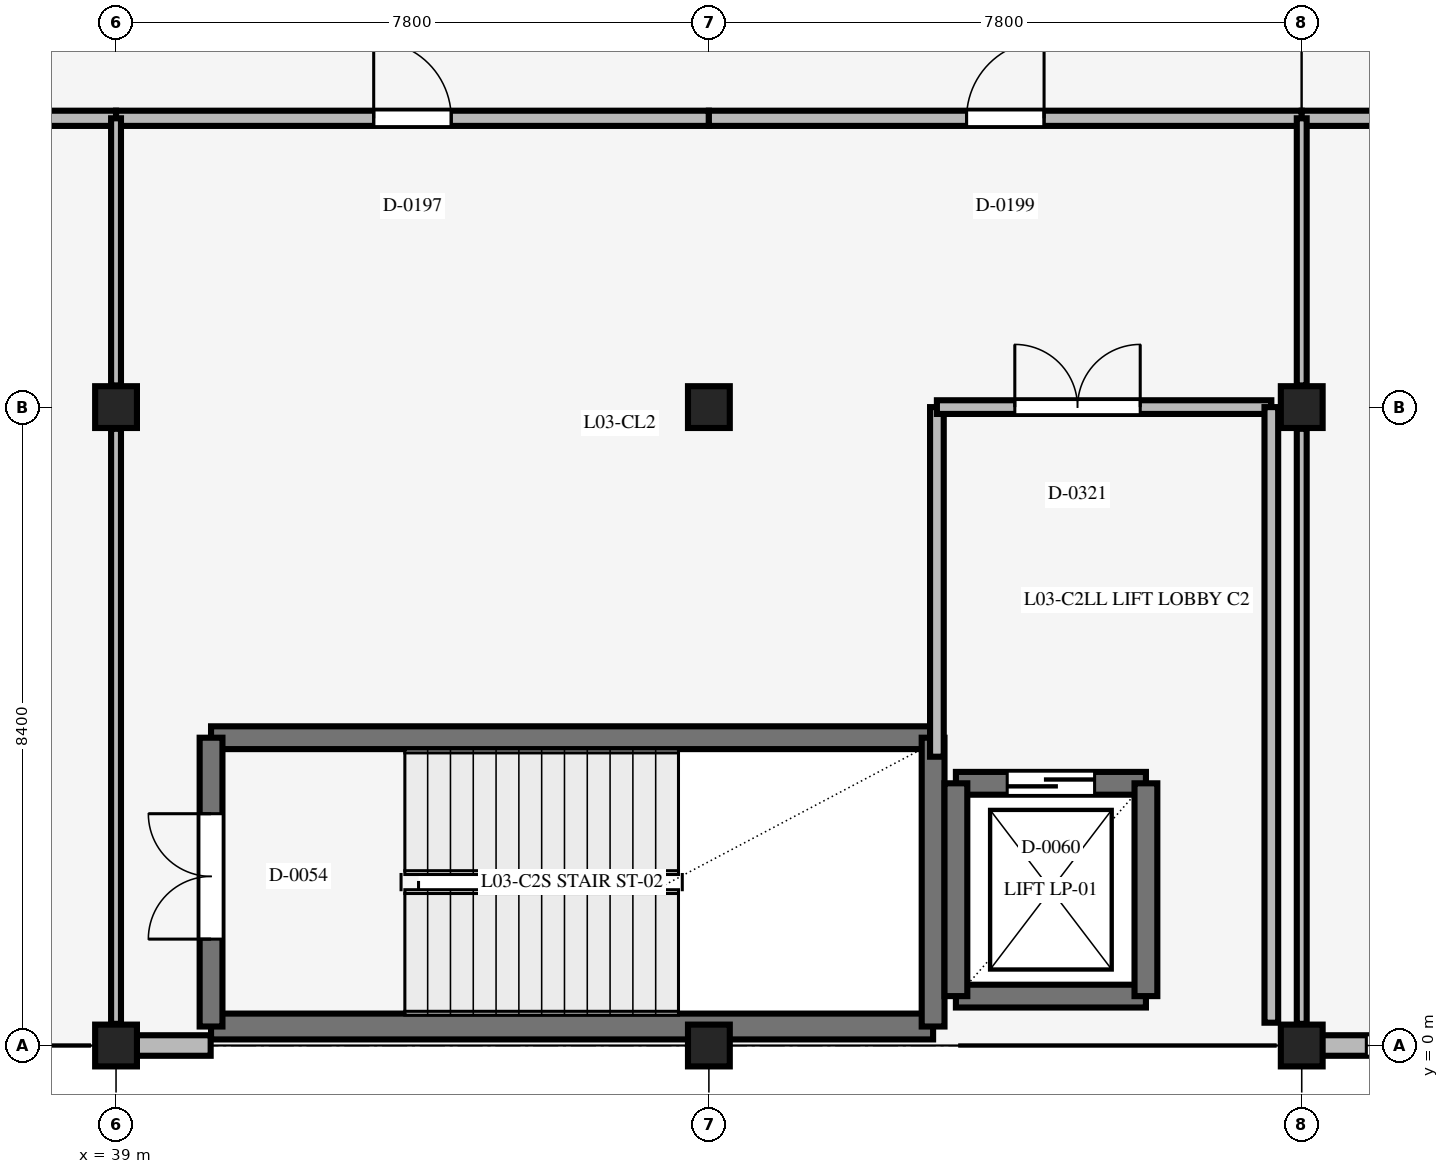
"""IFC4 building model, lengths in metres.
Left out: names, types, materials, properties, quantities, classifications, styles, units other than length and angle.
Written with IfcOpenShell. Run it as: python <this file> out.ifc"""

import sys

from ifc_helpers import new_model, si_unit, direction, frame, frame_2d, origin, origin_2d, place, context, subcontext, project, spatial, rectangle, extrude, element, fill, save


model = new_model("IFC4")
c1 = context("Model", 3, precision=1e-05, world=origin(), true_north=direction((0.0, 1.0)))
c2 = subcontext(c1, "Body", "Model", "MODEL_VIEW")
j1 = project(units=[si_unit("LENGTHUNIT", "METRE"), si_unit("PLANEANGLEUNIT", "RADIAN")], contexts=[c1])
p1 = place(None, origin())
s1 = spatial("IfcSite", under=j1, at=p1, CompositionType="ELEMENT")
p2 = place(p1, origin())
s2 = spatial("IfcBuilding", under=s1, at=p2, CompositionType="ELEMENT")
p3 = place(p2, frame((0.0, 0.0, 15.9)))
s3 = spatial("IfcBuildingStorey", under=s2, at=p3, CompositionType="ELEMENT", Elevation=15.9)
for number, where, z_axis, x_axis in (
    (1, (39.0, 0.0, 0.0), (0.0, 0.0, 1.0), (1.0, 0.0, 0.0)),
    (2, (39.0, 8.4, 0.0), (0.0, 0.0, 1.0), (1.0, 0.0, 0.0)),
    (3, (46.8, 0.0, 0.0), (0.0, 0.0, 1.0), (1.0, 0.0, 0.0)),
    (4, (46.8, 8.4, 0.0), (0.0, 0.0, 1.0), (1.0, 0.0, 0.0)),
    (5, (54.6, 0.0, 0.0), (0.0, 0.0, 1.0), (1.0, 0.0, 0.0)),
    (6, (54.6, 8.4, 0.0), (0.0, 0.0, 1.0), (1.0, 0.0, 0.0)),
):
    element("IfcColumn", number, at=place(p3, frame(where, z_axis=z_axis, x_axis=x_axis)), inside=s3, PredefinedType="COLUMN", context=c2, shape_type="SweptSolid", body=[
        extrude(rectangle(XDim=0.55, YDim=0.55, at=origin_2d()), origin(), (0.0, 0.0, 1.0), 3.9),
    ])
p4 = place(p3, frame((49.75, 0.25, 0.0), z_axis=(0.0, 0.0, 1.0), x_axis=(-1.0, 0.0, 0.0)))
e7 = element("IfcWall", 7, at=p4, inside=s3, PredefinedType="STANDARD", context=c2, shape_type="SweptSolid", body=[
    extrude(rectangle(XDim=9.5, YDim=0.34, at=frame_2d((4.75, 0.0))), origin(), (0.0, 0.0, 1.0), 3.9),
])
p5 = place(p3, frame((40.25, 4.05, 0.0), z_axis=(0.0, 0.0, 1.0), x_axis=(1.0, 0.0, 0.0)))
e8 = element("IfcWall", 8, at=p5, inside=s3, PredefinedType="SHEAR", context=c2, shape_type="SweptSolid", body=[
    extrude(rectangle(XDim=9.5, YDim=0.3, at=frame_2d((4.75, 0.0))), origin(), (0.0, 0.0, 1.0), 3.9),
])
p6 = place(p3, frame((40.25, 0.25, 0.0), z_axis=(0.0, 0.0, 1.0), x_axis=(0.0, 1.0, 0.0)))
e9 = element("IfcWall", 9, at=p6, inside=s3, PredefinedType="SHEAR", context=c2, shape_type="SweptSolid", body=[
    extrude(rectangle(XDim=3.8, YDim=0.3, at=frame_2d((1.9, 0.0))), origin(), (0.0, 0.0, 1.0), 3.9),
])
p7 = place(p6, frame((1.15, 0.0, 0.0)))
e10 = element("IfcOpeningElement", 10, at=p7, cuts=e9, PredefinedType="OPENING", context=c2, shape_type="SweptSolid", body=[
    extrude(rectangle(XDim=1.65, YDim=2.2, at=frame_2d((0.825, 1.1))), frame((0.0, 0.16, 0.0), z_axis=(0.0, -1.0, 0.0), x_axis=(1.0, 0.0, 0.0)), (0.0, 0.0, 1.0), 0.32),
])
p8 = place(p3, frame((49.75, 0.25, 0.0), z_axis=(0.0, 0.0, 1.0), x_axis=(0.0, 1.0, 0.0)))
e11 = element("IfcWall", 11, at=p8, inside=s3, PredefinedType="SHEAR", context=c2, shape_type="SweptSolid", body=[
    extrude(rectangle(XDim=3.8, YDim=0.3, at=frame_2d((1.9, 0.0))), origin(), (0.0, 0.0, 1.0), 3.9),
])
p9 = place(p3, frame((50.05, 0.65, 0.0), z_axis=(0.0, 0.0, 1.0), x_axis=(1.0, 0.0, 0.0)))
e12 = element("IfcWall", 12, at=p9, inside=s3, PredefinedType="SHEAR", context=c2, shape_type="SweptSolid", body=[
    extrude(rectangle(XDim=2.5, YDim=0.3, at=frame_2d((1.25, 0.0))), origin(), (0.0, 0.0, 1.0), 3.64),
])
p10 = place(p3, frame((50.05, 3.45, 0.0), z_axis=(0.0, 0.0, 1.0), x_axis=(1.0, 0.0, 0.0)))
e13 = element("IfcWall", 13, at=p10, inside=s3, PredefinedType="SHEAR", context=c2, shape_type="SweptSolid", body=[
    extrude(rectangle(XDim=2.5, YDim=0.3, at=frame_2d((1.25, 0.0))), origin(), (0.0, 0.0, 1.0), 3.64),
])
p11 = place(p10, frame((0.675, 0.0, 0.0)))
e14 = element("IfcOpeningElement", 14, at=p11, cuts=e13, PredefinedType="OPENING", context=c2, shape_type="SweptSolid", body=[
    extrude(rectangle(XDim=1.15, YDim=2.2, at=frame_2d((0.575, 1.1))), frame((0.0, 0.16, 0.0), z_axis=(0.0, -1.0, 0.0), x_axis=(1.0, 0.0, 0.0)), (0.0, 0.0, 1.0), 0.32),
])
for number, where, z_axis, x_axis in (
    (15, (50.05, 0.65, 0.0), (0.0, 0.0, 1.0), (0.0, 1.0, 0.0)),
    (16, (52.55, 0.65, 0.0), (0.0, 0.0, 1.0), (0.0, 1.0, 0.0)),
):
    element("IfcWall", number, at=place(p3, frame(where, z_axis=z_axis, x_axis=x_axis)), inside=s3, PredefinedType="SHEAR", context=c2, shape_type="SweptSolid", body=[
        extrude(rectangle(XDim=2.8, YDim=0.3, at=frame_2d((1.4, 0.0))), origin(), (0.0, 0.0, 1.0), 3.64),
    ])
p12 = place(p3, frame((40.245, 0.0, 0.0), z_axis=(0.0, 0.0, 1.0), x_axis=(-1.0, 0.0, 0.0)))
e17 = element("IfcWall", 17, at=p12, inside=s3, PredefinedType="STANDARD", context=c2, shape_type="SweptSolid", body=[
    extrude(rectangle(XDim=0.98, YDim=0.27, at=frame_2d((0.49, 0.0))), origin(), (0.0, 0.0, 1.0), 3.64),
])
p13 = place(p3, frame((57.445, 0.0, 0.0), z_axis=(0.0, 0.0, 1.0), x_axis=(-1.0, 0.0, 0.0)))
e18 = element("IfcWall", 18, at=p13, inside=s3, PredefinedType="STANDARD", context=c2, shape_type="SweptSolid", body=[
    extrude(rectangle(XDim=2.58, YDim=0.27, at=frame_2d((1.29, 0.0))), origin(), (0.0, 0.0, 1.0), 3.64),
])
p14 = place(p13, frame((0.495, 0.0, 0.95)))
e19 = element("IfcOpeningElement", 19, at=p14, cuts=e18, PredefinedType="OPENING", context=c2, shape_type="SweptSolid", body=[
    extrude(rectangle(XDim=1.5, YDim=1.6, at=frame_2d((0.75, 0.8))), frame((0.0, 0.145, 0.0), z_axis=(0.0, -1.0, 0.0), x_axis=(1.0, 0.0, 0.0)), (0.0, 0.0, 1.0), 0.29),
])
p15 = place(p3, frame((31.2, 12.2, 0.0), z_axis=(0.0, 0.0, 1.0), x_axis=(1.0, 0.0, 0.0)))
e20 = element("IfcWall", 20, at=p15, inside=s3, PredefinedType="STANDARD", context=c2, shape_type="SweptSolid", body=[
    extrude(rectangle(XDim=7.8, YDim=0.2, at=frame_2d((3.9, 0.0))), origin(), (0.0, 0.0, 1.0), 2.9),
])
p16 = place(p15, frame((3.39, 0.0, 0.0)))
e21 = element("IfcOpeningElement", 21, at=p16, cuts=e20, PredefinedType="OPENING", context=c2, shape_type="SweptSolid", body=[
    extrude(rectangle(XDim=1.02, YDim=2.15, at=frame_2d((0.51, 1.075))), frame((0.0, 0.11, 0.0), z_axis=(0.0, -1.0, 0.0), x_axis=(1.0, 0.0, 0.0)), (0.0, 0.0, 1.0), 0.22),
])
p17 = place(p3, frame((39.0, 12.2, 0.0), z_axis=(0.0, 0.0, 1.0), x_axis=(1.0, 0.0, 0.0)))
e22 = element("IfcWall", 22, at=p17, inside=s3, PredefinedType="STANDARD", context=c2, shape_type="SweptSolid", body=[
    extrude(rectangle(XDim=7.8, YDim=0.2, at=frame_2d((3.9, 0.0))), origin(), (0.0, 0.0, 1.0), 2.9),
])
p18 = place(p17, frame((3.39, 0.0, 0.0)))
e23 = element("IfcOpeningElement", 23, at=p18, cuts=e22, PredefinedType="OPENING", context=c2, shape_type="SweptSolid", body=[
    extrude(rectangle(XDim=1.02, YDim=2.15, at=frame_2d((0.51, 1.075))), frame((0.0, 0.11, 0.0), z_axis=(0.0, -1.0, 0.0), x_axis=(1.0, 0.0, 0.0)), (0.0, 0.0, 1.0), 0.22),
])
p19 = place(p3, frame((46.8, 12.2, 0.0), z_axis=(0.0, 0.0, 1.0), x_axis=(1.0, 0.0, 0.0)))
e24 = element("IfcWall", 24, at=p19, inside=s3, PredefinedType="STANDARD", context=c2, shape_type="SweptSolid", body=[
    extrude(rectangle(XDim=7.8, YDim=0.2, at=frame_2d((3.9, 0.0))), origin(), (0.0, 0.0, 1.0), 2.9),
])
p20 = place(p19, frame((3.39, 0.0, 0.0)))
e25 = element("IfcOpeningElement", 25, at=p20, cuts=e24, PredefinedType="OPENING", context=c2, shape_type="SweptSolid", body=[
    extrude(rectangle(XDim=1.02, YDim=2.15, at=frame_2d((0.51, 1.075))), frame((0.0, 0.11, 0.0), z_axis=(0.0, -1.0, 0.0), x_axis=(1.0, 0.0, 0.0)), (0.0, 0.0, 1.0), 0.22),
])
p21 = place(p3, frame((54.6, 12.2, 0.0), z_axis=(0.0, 0.0, 1.0), x_axis=(1.0, 0.0, 0.0)))
e26 = element("IfcWall", 26, at=p21, inside=s3, PredefinedType="STANDARD", context=c2, shape_type="SweptSolid", body=[
    extrude(rectangle(XDim=8.58, YDim=0.2, at=frame_2d((4.29, 0.0))), origin(), (0.0, 0.0, 1.0), 2.9),
])
p22 = place(p21, frame((3.69, 0.0, 0.0)))
e27 = element("IfcOpeningElement", 27, at=p22, cuts=e26, PredefinedType="OPENING", context=c2, shape_type="SweptSolid", body=[
    extrude(rectangle(XDim=1.02, YDim=2.15, at=frame_2d((0.51, 1.075))), frame((0.0, 0.11, 0.0), z_axis=(0.0, -1.0, 0.0), x_axis=(1.0, 0.0, 0.0)), (0.0, 0.0, 1.0), 0.22),
])
p23 = place(p3, frame((39.0, 0.285, 0.0), z_axis=(0.0, 0.0, 1.0), x_axis=(0.0, 1.0, 0.0)))
e28 = element("IfcWall", 28, at=p23, inside=s3, PredefinedType="STANDARD", context=c2, shape_type="SweptSolid", body=[
    extrude(rectangle(XDim=7.83, YDim=0.13, at=frame_2d((3.915, 0.0))), origin(), (0.0, 0.0, 1.0), 2.9),
])
p24 = place(p3, frame((39.0, 8.685, 0.0), z_axis=(0.0, 0.0, 1.0), x_axis=(0.0, 1.0, 0.0)))
e29 = element("IfcWall", 29, at=p24, inside=s3, PredefinedType="STANDARD", context=c2, shape_type="SweptSolid", body=[
    extrude(rectangle(XDim=3.515, YDim=0.13, at=frame_2d((1.757, 0.0))), origin(), (0.0, 0.0, 1.0), 2.9),
])
p25 = place(p3, frame((54.6, 0.285, 0.0), z_axis=(0.0, 0.0, 1.0), x_axis=(0.0, 1.0, 0.0)))
e30 = element("IfcWall", 30, at=p25, inside=s3, PredefinedType="STANDARD", context=c2, shape_type="SweptSolid", body=[
    extrude(rectangle(XDim=7.83, YDim=0.13, at=frame_2d((3.915, 0.0))), origin(), (0.0, 0.0, 1.0), 2.9),
])
p26 = place(p3, frame((54.6, 8.685, 0.0), z_axis=(0.0, 0.0, 1.0), x_axis=(0.0, 1.0, 0.0)))
e31 = element("IfcWall", 31, at=p26, inside=s3, PredefinedType="STANDARD", context=c2, shape_type="SweptSolid", body=[
    extrude(rectangle(XDim=3.515, YDim=0.13, at=frame_2d((1.757, 0.0))), origin(), (0.0, 0.0, 1.0), 2.9),
])
p27 = place(p3, frame((49.8, 3.8, 0.0), z_axis=(0.0, 0.0, 1.0), x_axis=(0.0, 1.0, 0.0)))
e32 = element("IfcWall", 32, at=p27, inside=s3, PredefinedType="STANDARD", context=c2, shape_type="SweptSolid", body=[
    extrude(rectangle(XDim=4.6, YDim=0.18, at=frame_2d((2.3, 0.0))), origin(), (0.0, 0.0, 1.0), 2.9),
])
p28 = place(p3, frame((49.8, 8.4, 0.0), z_axis=(0.0, 0.0, 1.0), x_axis=(1.0, 0.0, 0.0)))
e33 = element("IfcWall", 33, at=p28, inside=s3, PredefinedType="STANDARD", context=c2, shape_type="SweptSolid", body=[
    extrude(rectangle(XDim=4.4, YDim=0.18, at=frame_2d((2.2, 0.0))), origin(), (0.0, 0.0, 1.0), 2.9),
])
p29 = place(p28, frame((1.025, 0.0, 0.0)))
e34 = element("IfcOpeningElement", 34, at=p29, cuts=e33, PredefinedType="OPENING", context=c2, shape_type="SweptSolid", body=[
    extrude(rectangle(XDim=1.65, YDim=2.2, at=frame_2d((0.825, 1.1))), frame((0.0, 0.1, 0.0), z_axis=(0.0, -1.0, 0.0), x_axis=(1.0, 0.0, 0.0)), (0.0, 0.0, 1.0), 0.2),
])
p30 = place(p3, frame((54.2, 0.3, 0.0), z_axis=(0.0, 0.0, 1.0), x_axis=(0.0, 1.0, 0.0)))
e35 = element("IfcWall", 35, at=p30, inside=s3, PredefinedType="STANDARD", context=c2, shape_type="SweptSolid", body=[
    extrude(rectangle(XDim=8.1, YDim=0.18, at=frame_2d((4.05, 0.0))), origin(), (0.0, 0.0, 1.0), 2.9),
])
p31 = place(p14, origin())
e36 = element("IfcWindow", 36, at=p31, inside=s3, PartitioningType="SINGLE_PANEL", PredefinedType="WINDOW", context=c2, shape_type="SweptSolid", body=[
    extrude(rectangle(XDim=1.5, YDim=1.6, at=frame_2d((0.75, 0.8))), frame((0.0, 0.03, 0.0), z_axis=(0.0, -1.0, 0.0), x_axis=(1.0, 0.0, 0.0)), (0.0, 0.0, 1.0), 0.06),
])
fill(e19, e36)
p32 = place(p7, origin())
e37 = element("IfcDoor", 37, at=p32, inside=s3, OperationType="DOUBLE_DOOR_SINGLE_SWING", PredefinedType="DOOR", context=c2, shape_type="SweptSolid", body=[
    extrude(rectangle(XDim=1.65, YDim=2.2, at=frame_2d((0.825, 1.1))), frame((0.0, 0.025, 0.0), z_axis=(0.0, -1.0, 0.0), x_axis=(1.0, 0.0, 0.0)), (0.0, 0.0, 1.0), 0.05),
])
fill(e10, e37)
p33 = place(p11, origin())
e38 = element("IfcDoor", 38, at=p33, inside=s3, OperationType="DOUBLE_DOOR_SLIDING", PredefinedType="DOOR", context=c2, shape_type="SweptSolid", body=[
    extrude(rectangle(XDim=1.15, YDim=2.2, at=frame_2d((0.575, 1.1))), frame((0.0, 0.025, 0.0), z_axis=(0.0, -1.0, 0.0), x_axis=(1.0, 0.0, 0.0)), (0.0, 0.0, 1.0), 0.05),
])
fill(e14, e38)
p34 = place(p18, origin())
e39 = element("IfcDoor", 39, at=p34, inside=s3, OperationType="SINGLE_SWING_LEFT", PredefinedType="DOOR", context=c2, shape_type="SweptSolid", body=[
    extrude(rectangle(XDim=1.02, YDim=2.15, at=frame_2d((0.51, 1.075))), frame((0.0, 0.025, 0.0), z_axis=(0.0, -1.0, 0.0), x_axis=(1.0, 0.0, 0.0)), (0.0, 0.0, 1.0), 0.05),
])
fill(e23, e39)
p35 = place(p20, origin())
e40 = element("IfcDoor", 40, at=p35, inside=s3, OperationType="SINGLE_SWING_RIGHT", PredefinedType="DOOR", context=c2, shape_type="SweptSolid", body=[
    extrude(rectangle(XDim=1.02, YDim=2.15, at=frame_2d((0.51, 1.075))), frame((0.0, 0.025, 0.0), z_axis=(0.0, -1.0, 0.0), x_axis=(1.0, 0.0, 0.0)), (0.0, 0.0, 1.0), 0.05),
])
fill(e25, e40)
p36 = place(p29, origin())
e41 = element("IfcDoor", 41, at=p36, inside=s3, OperationType="DOUBLE_DOOR_SINGLE_SWING", PredefinedType="DOOR", context=c2, shape_type="SweptSolid", body=[
    extrude(rectangle(XDim=1.65, YDim=2.2, at=frame_2d((0.825, 1.1))), frame((0.0, 0.025, 0.0), z_axis=(0.0, -1.0, 0.0), x_axis=(1.0, 0.0, 0.0)), (0.0, 0.0, 1.0), 0.05),
])
fill(e34, e41)
save(model, sys.argv[1])
